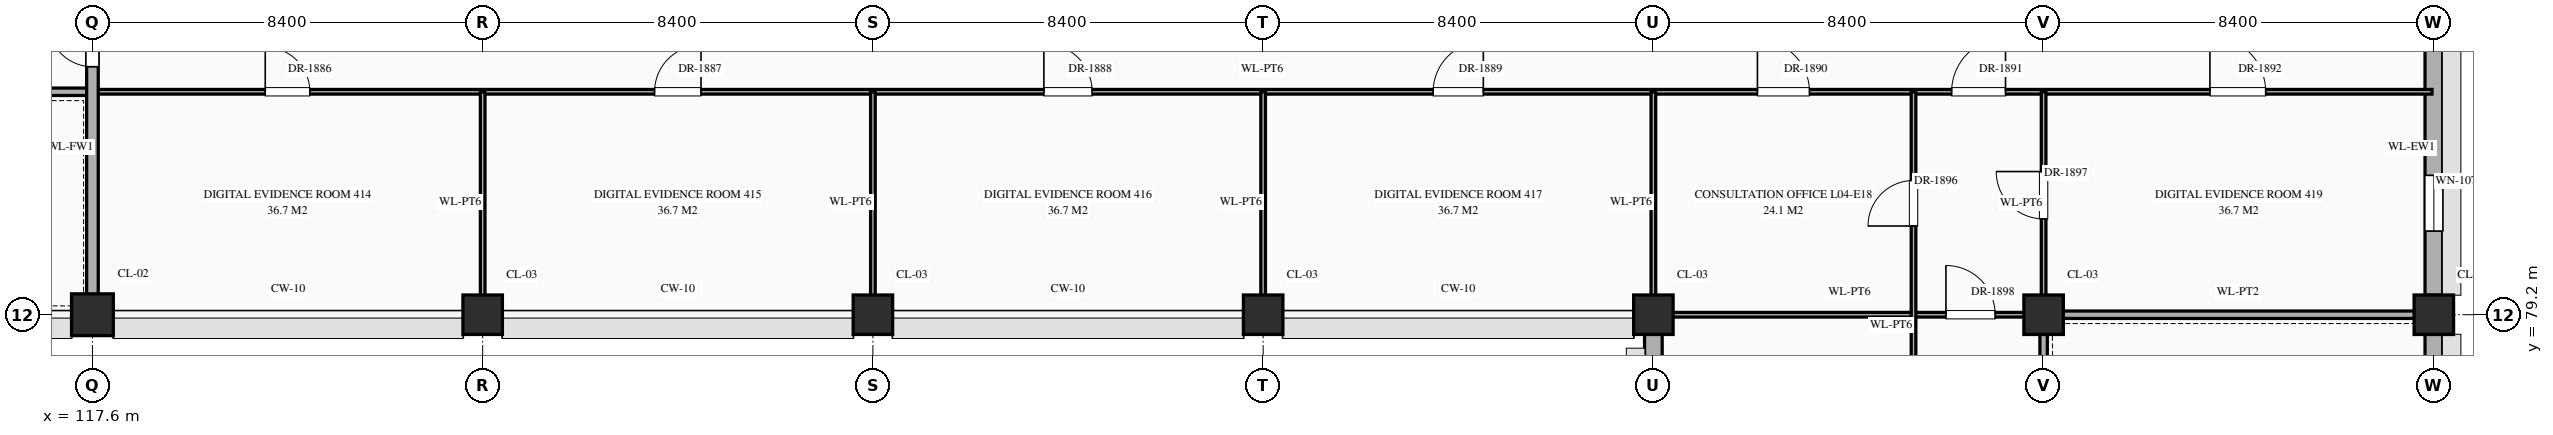
"""IFC4 building model, lengths in metres.
Left out: names, types, materials, properties, quantities, classifications, styles, units other than length and angle.
Written with IfcOpenShell. Run it as: python <this file> out.ifc"""

import sys

from ifc_helpers import new_model, si_unit, direction, frame, frame_2d, origin, origin_2d, place, context, subcontext, project, spatial, rectangle, extrude, element, fill, save


model = new_model("IFC4")
c1 = context("Model", 3, precision=1e-05, world=origin(), true_north=direction((0.0, 1.0)))
c2 = subcontext(c1, "Body", "Model", "MODEL_VIEW")
j1 = project(units=[si_unit("LENGTHUNIT", "METRE"), si_unit("PLANEANGLEUNIT", "RADIAN")], contexts=[c1])
p1 = place(None, origin())
s1 = spatial("IfcSite", under=j1, at=p1, CompositionType="ELEMENT")
p2 = place(p1, origin())
s2 = spatial("IfcBuilding", under=s1, at=p2, CompositionType="ELEMENT")
p3 = place(p2, frame((0.0, 0.0, 16.2)))
s3 = spatial("IfcBuildingStorey", under=s2, at=p3, CompositionType="ELEMENT", Elevation=16.2)
p4 = place(p3, frame((117.6, 79.2, 0.0), z_axis=(0.0, 0.0, 1.0), x_axis=(1.0, 0.0, 0.0)))
e1 = element("IfcColumn", 1, at=p4, inside=s3, PredefinedType="COLUMN", context=c2, shape_type="SweptSolid", body=[
    extrude(rectangle(XDim=0.9, YDim=0.9, at=origin_2d()), origin(), (0.0, 0.0, 1.0), 5.4),
])
for number, where, z_axis, x_axis in (
    (2, (126.0, 79.2, 0.0), (0.0, 0.0, 1.0), (1.0, 0.0, 0.0)),
    (3, (134.4, 79.2, 0.0), (0.0, 0.0, 1.0), (1.0, 0.0, 0.0)),
    (4, (142.8, 79.2, 0.0), (0.0, 0.0, 1.0), (1.0, 0.0, 0.0)),
    (5, (151.2, 79.2, 0.0), (0.0, 0.0, 1.0), (1.0, 0.0, 0.0)),
    (6, (159.6, 79.2, 0.0), (0.0, 0.0, 1.0), (1.0, 0.0, 0.0)),
    (7, (168.0, 79.2, 0.0), (0.0, 0.0, 1.0), (1.0, 0.0, 0.0)),
):
    element("IfcColumn", number, at=place(p3, frame(where, z_axis=z_axis, x_axis=x_axis)), inside=s3, PredefinedType="COLUMN", context=c2, shape_type="SweptSolid", body=[
        extrude(rectangle(XDim=0.85, YDim=0.85, at=origin_2d()), origin(), (0.0, 0.0, 1.0), 5.4),
    ])
p5 = place(p3, frame((151.2, 72.42, 0.0), z_axis=(0.0, 0.0, 1.0), x_axis=(0.0, 1.0, 0.0)))
e8 = element("IfcWall", 8, at=p5, inside=s3, PredefinedType="STANDARD", context=c2, shape_type="SweptSolid", body=[
    extrude(rectangle(XDim=6.36, YDim=0.38, at=frame_2d((3.18, 0.0))), origin(), (0.0, 0.0, 1.0), 4.55),
])
p6 = place(p5, frame((2.655, 0.0, 0.85)))
e9 = element("IfcOpeningElement", 9, at=p6, cuts=e8, PredefinedType="OPENING", context=c2, shape_type="SweptSolid", body=[
    extrude(rectangle(XDim=1.05, YDim=1.92, at=frame_2d((0.525, 0.96))), frame((0.0, 0.202, 0.0), z_axis=(0.0, -1.0, 0.0), x_axis=(1.0, 0.0, 0.0)), (0.0, 0.0, 1.0), 0.404),
])
p7 = place(p3, frame((168.0, 72.42, 0.0), z_axis=(0.0, 0.0, 1.0), x_axis=(0.0, 1.0, 0.0)))
e10 = element("IfcWall", 10, at=p7, inside=s3, PredefinedType="STANDARD", context=c2, shape_type="SweptSolid", body=[
    extrude(rectangle(XDim=6.36, YDim=0.38, at=frame_2d((3.18, 0.0))), origin(), (0.0, 0.0, 1.0), 4.55),
])
p8 = place(p7, frame((2.655, 0.0, 0.85)))
e11 = element("IfcOpeningElement", 11, at=p8, cuts=e10, PredefinedType="OPENING", context=c2, shape_type="SweptSolid", body=[
    extrude(rectangle(XDim=1.05, YDim=1.56, at=frame_2d((0.525, 0.78))), frame((0.0, 0.202, 0.0), z_axis=(0.0, -1.0, 0.0), x_axis=(1.0, 0.0, 0.0)), (0.0, 0.0, 1.0), 0.404),
])
p9 = place(p3, frame((168.0, 79.62, 0.0), z_axis=(0.0, 0.0, 1.0), x_axis=(0.0, 1.0, 0.0)))
e12 = element("IfcWall", 12, at=p9, inside=s3, PredefinedType="STANDARD", context=c2, shape_type="SweptSolid", body=[
    extrude(rectangle(XDim=6.36, YDim=0.38, at=frame_2d((3.18, 0.0))), origin(), (0.0, 0.0, 1.0), 4.55),
])
p10 = place(p9, frame((1.38, 0.0, 0.85)))
e13 = element("IfcOpeningElement", 13, at=p10, cuts=e12, PredefinedType="OPENING", context=c2, shape_type="SweptSolid", body=[
    extrude(rectangle(XDim=1.2, YDim=1.74, at=frame_2d((0.6, 0.87))), frame((0.0, 0.202, 0.0), z_axis=(0.0, -1.0, 0.0), x_axis=(1.0, 0.0, 0.0)), (0.0, 0.0, 1.0), 0.404),
])
p11 = place(p3, frame((151.24, 79.2, 0.0), z_axis=(0.0, 0.0, 1.0), x_axis=(1.0, 0.0, 0.0)))
e14 = element("IfcWall", 14, at=p11, inside=s3, PredefinedType="STANDARD", context=c2, shape_type="SweptSolid", body=[
    extrude(rectangle(XDim=8.36, YDim=0.1, at=frame_2d((4.18, 0.0))), origin(), (0.0, 0.0, 1.0), 4.35),
])
p12 = place(p11, frame((6.258, 0.0, 0.0)))
e15 = element("IfcOpeningElement", 15, at=p12, cuts=e14, PredefinedType="OPENING", context=c2, shape_type="SweptSolid", body=[
    extrude(rectangle(XDim=1.06, YDim=2.4, at=frame_2d((0.53, 1.2))), frame((0.0, 0.062, 0.0), z_axis=(0.0, -1.0, 0.0), x_axis=(1.0, 0.0, 0.0)), (0.0, 0.0, 1.0), 0.124),
])
p13 = place(p3, frame((159.6, 79.2, 0.0), z_axis=(0.0, 0.0, 1.0), x_axis=(1.0, 0.0, 0.0)))
e16 = element("IfcWall", 16, at=p13, inside=s3, PredefinedType="STANDARD", context=c2, shape_type="SweptSolid", body=[
    extrude(rectangle(XDim=8.36, YDim=0.16, at=frame_2d((4.18, 0.0))), origin(), (0.0, 0.0, 1.0), 4.35),
])
p14 = place(p3, frame((100.8, 84.0, 0.0), z_axis=(0.0, 0.0, 1.0), x_axis=(1.0, 0.0, 0.0)))
e17 = element("IfcWall", 17, at=p14, inside=s3, PredefinedType="STANDARD", context=c2, shape_type="SweptSolid", body=[
    extrude(rectangle(XDim=16.8, YDim=0.16, at=frame_2d((8.4, 0.0))), origin(), (0.0, 0.0, 1.0), 5.12),
])
p15 = place(p14, frame((7.45, 0.0, 0.0)))
e18 = element("IfcOpeningElement", 18, at=p15, cuts=e17, PredefinedType="OPENING", context=c2, shape_type="SweptSolid", body=[
    extrude(rectangle(XDim=1.9, YDim=2.5, at=frame_2d((0.95, 1.25))), frame((0.0, 0.092, 0.0), z_axis=(0.0, -1.0, 0.0), x_axis=(1.0, 0.0, 0.0)), (0.0, 0.0, 1.0), 0.184),
])
p16 = place(p3, frame((117.6, 84.0, 0.0), z_axis=(0.0, 0.0, 1.0), x_axis=(1.0, 0.0, 0.0)))
e19 = element("IfcWall", 19, at=p16, inside=s3, PredefinedType="STANDARD", context=c2, shape_type="SweptSolid", body=[
    extrude(rectangle(XDim=50.36, YDim=0.1, at=frame_2d((25.18, 0.0))), origin(), (0.0, 0.0, 1.0), 5.12),
])
p17 = place(p16, frame((3.72, 0.0, 0.0)))
e20 = element("IfcOpeningElement", 20, at=p17, cuts=e19, PredefinedType="OPENING", context=c2, shape_type="SweptSolid", body=[
    extrude(rectangle(XDim=0.96, YDim=2.2, at=frame_2d((0.48, 1.1))), frame((0.0, 0.062, 0.0), z_axis=(0.0, -1.0, 0.0), x_axis=(1.0, 0.0, 0.0)), (0.0, 0.0, 1.0), 0.124),
])
p18 = place(p16, frame((12.1, 0.0, 0.0)))
e21 = element("IfcOpeningElement", 21, at=p18, cuts=e19, PredefinedType="OPENING", context=c2, shape_type="SweptSolid", body=[
    extrude(rectangle(XDim=1.0, YDim=2.25, at=frame_2d((0.5, 1.125))), frame((0.0, 0.062, 0.0), z_axis=(0.0, -1.0, 0.0), x_axis=(1.0, 0.0, 0.0)), (0.0, 0.0, 1.0), 0.124),
])
p19 = place(p16, frame((20.48, 0.0, 0.0)))
e22 = element("IfcOpeningElement", 22, at=p19, cuts=e19, PredefinedType="OPENING", context=c2, shape_type="SweptSolid", body=[
    extrude(rectangle(XDim=1.04, YDim=2.2, at=frame_2d((0.52, 1.1))), frame((0.0, 0.062, 0.0), z_axis=(0.0, -1.0, 0.0), x_axis=(1.0, 0.0, 0.0)), (0.0, 0.0, 1.0), 0.124),
])
p20 = place(p16, frame((28.86, 0.0, 0.0)))
e23 = element("IfcOpeningElement", 23, at=p20, cuts=e19, PredefinedType="OPENING", context=c2, shape_type="SweptSolid", body=[
    extrude(rectangle(XDim=1.08, YDim=2.25, at=frame_2d((0.54, 1.125))), frame((0.0, 0.062, 0.0), z_axis=(0.0, -1.0, 0.0), x_axis=(1.0, 0.0, 0.0)), (0.0, 0.0, 1.0), 0.124),
])
p21 = place(p16, frame((35.84, 0.0, 0.0)))
e24 = element("IfcOpeningElement", 24, at=p21, cuts=e19, PredefinedType="OPENING", context=c2, shape_type="SweptSolid", body=[
    extrude(rectangle(XDim=1.12, YDim=2.25, at=frame_2d((0.56, 1.125))), frame((0.0, 0.062, 0.0), z_axis=(0.0, -1.0, 0.0), x_axis=(1.0, 0.0, 0.0)), (0.0, 0.0, 1.0), 0.124),
])
p22 = place(p16, frame((40.02, 0.0, 0.0)))
e25 = element("IfcOpeningElement", 25, at=p22, cuts=e19, PredefinedType="OPENING", context=c2, shape_type="SweptSolid", body=[
    extrude(rectangle(XDim=1.16, YDim=2.3, at=frame_2d((0.58, 1.15))), frame((0.0, 0.062, 0.0), z_axis=(0.0, -1.0, 0.0), x_axis=(1.0, 0.0, 0.0)), (0.0, 0.0, 1.0), 0.124),
])
p23 = place(p16, frame((45.58, 0.0, 0.0)))
e26 = element("IfcOpeningElement", 26, at=p23, cuts=e19, PredefinedType="OPENING", context=c2, shape_type="SweptSolid", body=[
    extrude(rectangle(XDim=1.2, YDim=2.35, at=frame_2d((0.6, 1.175))), frame((0.0, 0.062, 0.0), z_axis=(0.0, -1.0, 0.0), x_axis=(1.0, 0.0, 0.0)), (0.0, 0.0, 1.0), 0.124),
])
p24 = place(p3, frame((117.6, 79.24, 0.0), z_axis=(0.0, 0.0, 1.0), x_axis=(0.0, 1.0, 0.0)))
e27 = element("IfcWall", 27, at=p24, inside=s3, PredefinedType="STANDARD", context=c2, shape_type="SweptSolid", body=[
    extrude(rectangle(XDim=7.16, YDim=0.25, at=frame_2d((3.58, 0.0))), origin(), (0.0, 0.0, 1.0), 4.37),
])
p25 = place(p24, frame((5.3, 0.0, 0.0)))
e28 = element("IfcOpeningElement", 28, at=p25, cuts=e27, PredefinedType="OPENING", context=c2, shape_type="SweptSolid", body=[
    extrude(rectangle(XDim=0.95, YDim=2.15, at=frame_2d((0.475, 1.075))), frame((0.0, 0.137, 0.0), z_axis=(0.0, -1.0, 0.0), x_axis=(1.0, 0.0, 0.0)), (0.0, 0.0, 1.0), 0.274),
])
for number, where, z_axis, x_axis in (
    (29, (126.0, 79.24, 0.0), (0.0, 0.0, 1.0), (0.0, 1.0, 0.0)),
    (30, (134.4, 79.24, 0.0), (0.0, 0.0, 1.0), (0.0, 1.0, 0.0)),
):
    element("IfcWall", number, at=place(p3, frame(where, z_axis=z_axis, x_axis=x_axis)), inside=s3, PredefinedType="STANDARD", context=c2, shape_type="SweptSolid", body=[
        extrude(rectangle(XDim=4.76, YDim=0.1, at=frame_2d((2.38, 0.0))), origin(), (0.0, 0.0, 1.0), 4.37),
    ])
for number, where, z_axis, x_axis in (
    (31, (142.8, 79.24, 0.0), (0.0, 0.0, 1.0), (0.0, 1.0, 0.0)),
    (32, (151.2, 79.24, 0.0), (0.0, 0.0, 1.0), (0.0, 1.0, 0.0)),
):
    element("IfcWall", number, at=place(p3, frame(where, z_axis=z_axis, x_axis=x_axis)), inside=s3, PredefinedType="STANDARD", context=c2, shape_type="SweptSolid", body=[
        extrude(rectangle(XDim=4.76, YDim=0.1, at=frame_2d((2.38, 0.0))), origin(), (0.0, 0.0, 1.0), 4.3),
    ])
p26 = place(p3, frame((156.8, 64.8, 0.0), z_axis=(0.0, 0.0, 1.0), x_axis=(0.0, 1.0, 0.0)))
e33 = element("IfcWall", 33, at=p26, inside=s3, PredefinedType="STANDARD", context=c2, shape_type="SweptSolid", body=[
    extrude(rectangle(XDim=19.2, YDim=0.1, at=frame_2d((9.6, 0.0))), origin(), (0.0, 0.0, 1.0), 5.2),
])
p27 = place(p26, frame((16.31, 0.0, 0.0)))
e34 = element("IfcOpeningElement", 34, at=p27, cuts=e33, PredefinedType="OPENING", context=c2, shape_type="SweptSolid", body=[
    extrude(rectangle(XDim=0.98, YDim=2.35, at=frame_2d((0.49, 1.175))), frame((0.0, 0.062, 0.0), z_axis=(0.0, -1.0, 0.0), x_axis=(1.0, 0.0, 0.0)), (0.0, 0.0, 1.0), 0.124),
])
p28 = place(p26, frame((0.71, 0.0, 0.0)))
e35 = element("IfcOpeningElement", 35, at=p28, cuts=e33, PredefinedType="OPENING", context=c2, shape_type="SweptSolid", body=[
    extrude(rectangle(XDim=0.98, YDim=2.35, at=frame_2d((0.49, 1.175))), frame((0.0, 0.062, 0.0), z_axis=(0.0, -1.0, 0.0), x_axis=(1.0, 0.0, 0.0)), (0.0, 0.0, 1.0), 0.124),
])
p29 = place(p26, frame((4.29, 0.0, 0.0)))
e36 = element("IfcOpeningElement", 36, at=p29, cuts=e33, PredefinedType="OPENING", context=c2, shape_type="SweptSolid", body=[
    extrude(rectangle(XDim=1.02, YDim=2.4, at=frame_2d((0.51, 1.2))), frame((0.0, 0.062, 0.0), z_axis=(0.0, -1.0, 0.0), x_axis=(1.0, 0.0, 0.0)), (0.0, 0.0, 1.0), 0.124),
])
p30 = place(p26, frame((10.27, 0.0, 0.0)))
e37 = element("IfcOpeningElement", 37, at=p30, cuts=e33, PredefinedType="OPENING", context=c2, shape_type="SweptSolid", body=[
    extrude(rectangle(XDim=1.06, YDim=2.4, at=frame_2d((0.53, 1.2))), frame((0.0, 0.062, 0.0), z_axis=(0.0, -1.0, 0.0), x_axis=(1.0, 0.0, 0.0)), (0.0, 0.0, 1.0), 0.124),
])
p31 = place(p3, frame((159.6, 64.8, 0.0), z_axis=(0.0, 0.0, 1.0), x_axis=(0.0, 1.0, 0.0)))
e38 = element("IfcWall", 38, at=p31, inside=s3, PredefinedType="STANDARD", context=c2, shape_type="SweptSolid", body=[
    extrude(rectangle(XDim=14.4, YDim=0.16, at=frame_2d((7.2, 0.0))), origin(), (0.0, 0.0, 1.0), 5.2),
])
p32 = place(p31, frame((6.127, 0.0, 0.0)))
e39 = element("IfcOpeningElement", 39, at=p32, cuts=e38, PredefinedType="OPENING", context=c2, shape_type="SweptSolid", body=[
    extrude(rectangle(XDim=1.8, YDim=2.5, at=frame_2d((0.9, 1.25))), frame((0.0, 0.092, 0.0), z_axis=(0.0, -1.0, 0.0), x_axis=(1.0, 0.0, 0.0)), (0.0, 0.0, 1.0), 0.184),
])
p33 = place(p3, frame((159.6, 79.2, 0.0), z_axis=(0.0, 0.0, 1.0), x_axis=(0.0, 1.0, 0.0)))
e40 = element("IfcWall", 40, at=p33, inside=s3, PredefinedType="STANDARD", context=c2, shape_type="SweptSolid", body=[
    extrude(rectangle(XDim=4.8, YDim=0.1, at=frame_2d((2.4, 0.0))), origin(), (0.0, 0.0, 1.0), 4.45),
])
p34 = place(p33, frame((2.062, 0.0, 0.0)))
e41 = element("IfcOpeningElement", 41, at=p34, cuts=e40, PredefinedType="OPENING", context=c2, shape_type="SweptSolid", body=[
    extrude(rectangle(XDim=1.02, YDim=2.4, at=frame_2d((0.51, 1.2))), frame((0.0, 0.062, 0.0), z_axis=(0.0, -1.0, 0.0), x_axis=(1.0, 0.0, 0.0)), (0.0, 0.0, 1.0), 0.124),
])
p35 = place(p10, origin())
e42 = element("IfcWindow", 42, at=p35, inside=s3, PartitioningType="SINGLE_PANEL", PredefinedType="WINDOW", context=c2, shape_type="SweptSolid", body=[
    extrude(rectangle(XDim=1.2, YDim=1.74, at=frame_2d((0.6, 0.87))), frame((0.0, 0.03, 0.0), z_axis=(0.0, -1.0, 0.0), x_axis=(1.0, 0.0, 0.0)), (0.0, 0.0, 1.0), 0.06),
])
fill(e13, e42)
p36 = place(p25, origin())
e43 = element("IfcDoor", 43, at=p36, inside=s3, OperationType="SINGLE_SWING_RIGHT", PredefinedType="DOOR", context=c2, shape_type="SweptSolid", body=[
    extrude(rectangle(XDim=0.95, YDim=2.15, at=frame_2d((0.475, 1.075))), frame((0.0, 0.025, 0.0), z_axis=(0.0, -1.0, 0.0), x_axis=(1.0, 0.0, 0.0)), (0.0, 0.0, 1.0), 0.05),
])
fill(e28, e43)
p37 = place(p17, origin())
e44 = element("IfcDoor", 44, at=p37, inside=s3, OperationType="SINGLE_SWING_LEFT", PredefinedType="DOOR", context=c2, shape_type="SweptSolid", body=[
    extrude(rectangle(XDim=0.96, YDim=2.2, at=frame_2d((0.48, 1.1))), frame((0.0, 0.025, 0.0), z_axis=(0.0, -1.0, 0.0), x_axis=(1.0, 0.0, 0.0)), (0.0, 0.0, 1.0), 0.05),
])
fill(e20, e44)
p38 = place(p18, origin())
e45 = element("IfcDoor", 45, at=p38, inside=s3, OperationType="SINGLE_SWING_RIGHT", PredefinedType="DOOR", context=c2, shape_type="SweptSolid", body=[
    extrude(rectangle(XDim=1.0, YDim=2.25, at=frame_2d((0.5, 1.125))), frame((0.0, 0.025, 0.0), z_axis=(0.0, -1.0, 0.0), x_axis=(1.0, 0.0, 0.0)), (0.0, 0.0, 1.0), 0.05),
])
fill(e21, e45)
p39 = place(p19, origin())
e46 = element("IfcDoor", 46, at=p39, inside=s3, OperationType="SINGLE_SWING_LEFT", PredefinedType="DOOR", context=c2, shape_type="SweptSolid", body=[
    extrude(rectangle(XDim=1.04, YDim=2.2, at=frame_2d((0.52, 1.1))), frame((0.0, 0.025, 0.0), z_axis=(0.0, -1.0, 0.0), x_axis=(1.0, 0.0, 0.0)), (0.0, 0.0, 1.0), 0.05),
])
fill(e22, e46)
p40 = place(p20, origin())
e47 = element("IfcDoor", 47, at=p40, inside=s3, OperationType="SINGLE_SWING_RIGHT", PredefinedType="DOOR", context=c2, shape_type="SweptSolid", body=[
    extrude(rectangle(XDim=1.08, YDim=2.25, at=frame_2d((0.54, 1.125))), frame((0.0, 0.025, 0.0), z_axis=(0.0, -1.0, 0.0), x_axis=(1.0, 0.0, 0.0)), (0.0, 0.0, 1.0), 0.05),
])
fill(e23, e47)
p41 = place(p21, origin())
e48 = element("IfcDoor", 48, at=p41, inside=s3, OperationType="SINGLE_SWING_LEFT", PredefinedType="DOOR", context=c2, shape_type="SweptSolid", body=[
    extrude(rectangle(XDim=1.12, YDim=2.25, at=frame_2d((0.56, 1.125))), frame((0.0, 0.025, 0.0), z_axis=(0.0, -1.0, 0.0), x_axis=(1.0, 0.0, 0.0)), (0.0, 0.0, 1.0), 0.05),
])
fill(e24, e48)
p42 = place(p22, origin())
e49 = element("IfcDoor", 49, at=p42, inside=s3, OperationType="SINGLE_SWING_RIGHT", PredefinedType="DOOR", context=c2, shape_type="SweptSolid", body=[
    extrude(rectangle(XDim=1.16, YDim=2.3, at=frame_2d((0.58, 1.15))), frame((0.0, 0.025, 0.0), z_axis=(0.0, -1.0, 0.0), x_axis=(1.0, 0.0, 0.0)), (0.0, 0.0, 1.0), 0.05),
])
fill(e25, e49)
p43 = place(p23, origin())
e50 = element("IfcDoor", 50, at=p43, inside=s3, OperationType="SINGLE_SWING_LEFT", PredefinedType="DOOR", context=c2, shape_type="SweptSolid", body=[
    extrude(rectangle(XDim=1.2, YDim=2.35, at=frame_2d((0.6, 1.175))), frame((0.0, 0.025, 0.0), z_axis=(0.0, -1.0, 0.0), x_axis=(1.0, 0.0, 0.0)), (0.0, 0.0, 1.0), 0.05),
])
fill(e26, e50)
p44 = place(p27, origin())
e51 = element("IfcDoor", 51, at=p44, inside=s3, OperationType="SINGLE_SWING_LEFT", PredefinedType="DOOR", context=c2, shape_type="SweptSolid", body=[
    extrude(rectangle(XDim=0.98, YDim=2.35, at=frame_2d((0.49, 1.175))), frame((0.0, 0.025, 0.0), z_axis=(0.0, -1.0, 0.0), x_axis=(1.0, 0.0, 0.0)), (0.0, 0.0, 1.0), 0.05),
])
fill(e34, e51)
p45 = place(p34, origin())
e52 = element("IfcDoor", 52, at=p45, inside=s3, OperationType="SINGLE_SWING_RIGHT", PredefinedType="DOOR", context=c2, shape_type="SweptSolid", body=[
    extrude(rectangle(XDim=1.02, YDim=2.4, at=frame_2d((0.51, 1.2))), frame((0.0, 0.025, 0.0), z_axis=(0.0, -1.0, 0.0), x_axis=(1.0, 0.0, 0.0)), (0.0, 0.0, 1.0), 0.05),
])
fill(e41, e52)
p46 = place(p12, origin())
e53 = element("IfcDoor", 53, at=p46, inside=s3, OperationType="SINGLE_SWING_LEFT", PredefinedType="DOOR", context=c2, shape_type="SweptSolid", body=[
    extrude(rectangle(XDim=1.06, YDim=2.4, at=frame_2d((0.53, 1.2))), frame((0.0, 0.025, 0.0), z_axis=(0.0, -1.0, 0.0), x_axis=(1.0, 0.0, 0.0)), (0.0, 0.0, 1.0), 0.05),
])
fill(e15, e53)
save(model, sys.argv[1])
